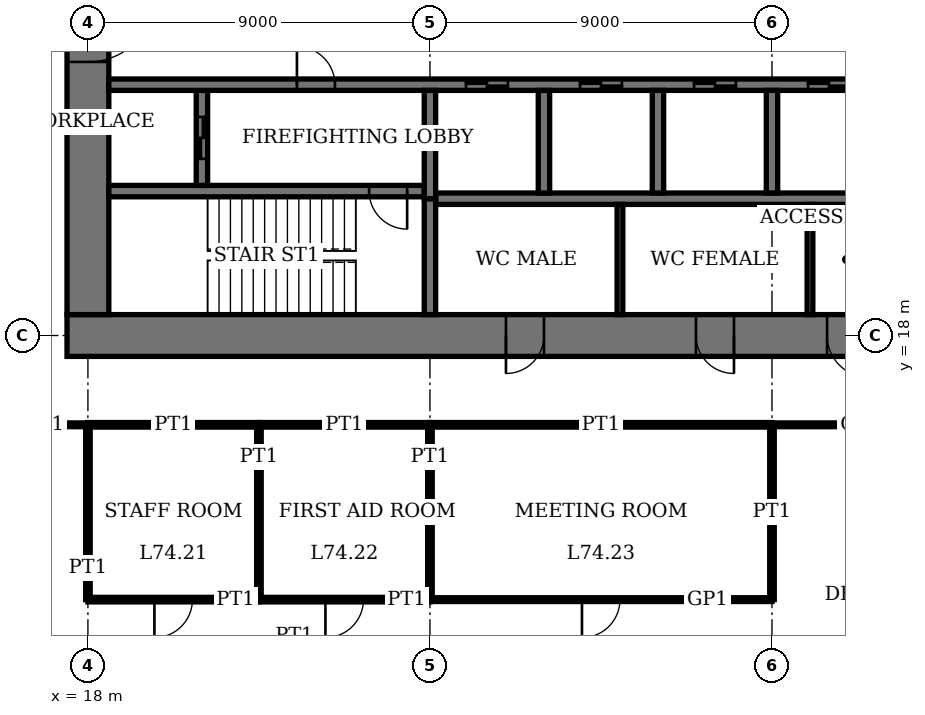
"""IFC4 building model, lengths in metres.
Left out: names, types, materials, properties, quantities, classifications, styles, units other than length and angle.
Written with IfcOpenShell. Run it as: python <this file> out.ifc"""

import sys

from ifc_helpers import new_model, si_unit, direction, frame, frame_2d, origin, place, context, subcontext, project, spatial, rectangle, extrude, element, fill, save


model = new_model("IFC4")
c1 = context("Model", 3, precision=1e-05, world=origin(), true_north=direction((0.0, 1.0)))
c2 = subcontext(c1, "Body", "Model", "MODEL_VIEW")
j1 = project(units=[si_unit("LENGTHUNIT", "METRE"), si_unit("PLANEANGLEUNIT", "RADIAN")], contexts=[c1])
p1 = place(None, origin())
s1 = spatial("IfcSite", under=j1, at=p1, CompositionType="ELEMENT")
p2 = place(p1, origin())
s2 = spatial("IfcBuilding", under=s1, at=p2, CompositionType="ELEMENT")
p3 = place(p2, frame((0.0, 0.0, 303.4)))
s3 = spatial("IfcBuildingStorey", under=s2, at=p3, CompositionType="ELEMENT", Elevation=303.4)
p4 = place(p3, frame((17.45, 18.0, 0.0), z_axis=(0.0, 0.0, 1.0), x_axis=(1.0, 0.0, 0.0)))
e1 = element("IfcWall", 1, at=p4, inside=s3, PredefinedType="SHEAR", context=c2, shape_type="SweptSolid", body=[
    extrude(rectangle(XDim=28.1, YDim=1.1, at=frame_2d((14.05, 0.0))), origin(), (0.0, 0.0, 1.0), 4.0),
])
p5 = place(p4, frame((11.55, 0.0, 0.0)))
e2 = element("IfcOpeningElement", 2, at=p5, cuts=e1, PredefinedType="OPENING", context=c2, shape_type="SweptSolid", body=[
    extrude(rectangle(XDim=1.0, YDim=2.4, at=frame_2d((0.5, 1.2))), frame((0.0, 0.56, 0.0), z_axis=(0.0, -1.0, 0.0), x_axis=(1.0, 0.0, 0.0)), (0.0, 0.0, 1.0), 1.12),
])
p6 = place(p4, frame((16.55, 0.0, 0.0)))
e3 = element("IfcOpeningElement", 3, at=p6, cuts=e1, PredefinedType="OPENING", context=c2, shape_type="SweptSolid", body=[
    extrude(rectangle(XDim=1.0, YDim=2.4, at=frame_2d((0.5, 1.2))), frame((0.0, 0.56, 0.0), z_axis=(0.0, -1.0, 0.0), x_axis=(1.0, 0.0, 0.0)), (0.0, 0.0, 1.0), 1.12),
])
p7 = place(p4, frame((20.0, 0.0, 0.0)))
e4 = element("IfcOpeningElement", 4, at=p7, cuts=e1, PredefinedType="OPENING", context=c2, shape_type="SweptSolid", body=[
    extrude(rectangle(XDim=1.1, YDim=2.4, at=frame_2d((0.55, 1.2))), frame((0.0, 0.56, 0.0), z_axis=(0.0, -1.0, 0.0), x_axis=(1.0, 0.0, 0.0)), (0.0, 0.0, 1.0), 1.12),
])
p8 = place(p4, frame((24.05, 0.0, 0.0)))
e5 = element("IfcOpeningElement", 5, at=p8, cuts=e1, PredefinedType="OPENING", context=c2, shape_type="SweptSolid", body=[
    extrude(rectangle(XDim=1.0, YDim=2.4, at=frame_2d((0.5, 1.2))), frame((0.0, 0.56, 0.0), z_axis=(0.0, -1.0, 0.0), x_axis=(1.0, 0.0, 0.0)), (0.0, 0.0, 1.0), 1.12),
])
p9 = place(p3, frame((18.0, 35.45, 0.0), z_axis=(0.0, 0.0, 1.0), x_axis=(0.0, -1.0, 0.0)))
e6 = element("IfcWall", 6, at=p9, inside=s3, PredefinedType="SHEAR", context=c2, shape_type="SweptSolid", body=[
    extrude(rectangle(XDim=16.9, YDim=1.1, at=frame_2d((8.45, 0.0))), origin(), (0.0, 0.0, 1.0), 4.0),
])
p10 = place(p9, frame((8.45, 0.0, 0.0)))
e7 = element("IfcOpeningElement", 7, at=p10, cuts=e6, PredefinedType="OPENING", context=c2, shape_type="SweptSolid", body=[
    extrude(rectangle(XDim=1.8, YDim=2.4, at=frame_2d((0.9, 1.2))), frame((0.0, 0.56, 0.0), z_axis=(0.0, -1.0, 0.0), x_axis=(1.0, 0.0, 0.0)), (0.0, 0.0, 1.0), 1.12),
])
p11 = place(p3, frame((18.55, 21.8, 0.0), z_axis=(0.0, 0.0, 1.0), x_axis=(1.0, 0.0, 0.0)))
e8 = element("IfcWall", 8, at=p11, inside=s3, PredefinedType="SHEAR", context=c2, shape_type="SweptSolid", body=[
    extrude(rectangle(XDim=8.3, YDim=0.3, at=frame_2d((4.15, 0.0))), origin(), (0.0, 0.0, 1.0), 4.0),
])
p12 = place(p11, frame((6.85, 0.0, 0.0)))
e9 = element("IfcOpeningElement", 9, at=p12, cuts=e8, PredefinedType="OPENING", context=c2, shape_type="SweptSolid", body=[
    extrude(rectangle(XDim=1.0, YDim=2.4, at=frame_2d((0.5, 1.2))), frame((0.0, 0.16, 0.0), z_axis=(0.0, -1.0, 0.0), x_axis=(1.0, 0.0, 0.0)), (0.0, 0.0, 1.0), 0.32),
])
p13 = place(p3, frame((27.0, 18.55, 0.0), z_axis=(0.0, 0.0, 1.0), x_axis=(0.0, 1.0, 0.0)))
e10 = element("IfcWall", 10, at=p13, inside=s3, PredefinedType="SHEAR", context=c2, shape_type="SweptSolid", body=[
    extrude(rectangle(XDim=3.05, YDim=0.3, at=frame_2d((1.525, 0.0))), origin(), (0.0, 0.0, 1.0), 4.0),
])
p14 = place(p3, frame((21.0, 21.95, 0.0), z_axis=(0.0, 0.0, 1.0), x_axis=(0.0, 1.0, 0.0)))
e11 = element("IfcWall", 11, at=p14, inside=s3, PredefinedType="SHEAR", context=c2, shape_type="SweptSolid", body=[
    extrude(rectangle(XDim=2.5, YDim=0.3, at=frame_2d((1.25, 0.0))), origin(), (0.0, 0.0, 1.0), 4.0),
])
p15 = place(p14, frame((0.7, 0.0, 0.0)))
e12 = element("IfcOpeningElement", 12, at=p15, cuts=e11, PredefinedType="OPENING", context=c2, shape_type="SweptSolid", body=[
    extrude(rectangle(XDim=1.1, YDim=2.4, at=frame_2d((0.55, 1.2))), frame((0.0, 0.16, 0.0), z_axis=(0.0, -1.0, 0.0), x_axis=(1.0, 0.0, 0.0)), (0.0, 0.0, 1.0), 0.32),
])
p16 = place(p3, frame((18.55, 24.6, 0.0), z_axis=(0.0, 0.0, 1.0), x_axis=(1.0, 0.0, 0.0)))
e13 = element("IfcWall", 13, at=p16, inside=s3, PredefinedType="SHEAR", context=c2, shape_type="SweptSolid", body=[
    extrude(rectangle(XDim=25.9, YDim=0.3, at=frame_2d((12.95, 0.0))), origin(), (0.0, 0.0, 1.0), 4.0),
])
p17 = place(p16, frame((4.95, 0.0, 0.0)))
e14 = element("IfcOpeningElement", 14, at=p17, cuts=e13, PredefinedType="OPENING", context=c2, shape_type="SweptSolid", body=[
    extrude(rectangle(XDim=1.0, YDim=2.4, at=frame_2d((0.5, 1.2))), frame((0.0, 0.16, 0.0), z_axis=(0.0, -1.0, 0.0), x_axis=(1.0, 0.0, 0.0)), (0.0, 0.0, 1.0), 0.32),
])
p18 = place(p16, frame((24.5, 0.0, 0.0)))
e15 = element("IfcOpeningElement", 15, at=p18, cuts=e13, PredefinedType="OPENING", context=c2, shape_type="SweptSolid", body=[
    extrude(rectangle(XDim=0.9, YDim=2.1, at=frame_2d((0.45, 1.05))), frame((0.0, 0.16, 0.0), z_axis=(0.0, -1.0, 0.0), x_axis=(1.0, 0.0, 0.0)), (0.0, 0.0, 1.0), 0.32),
])
p19 = place(p16, frame((9.4, 0.0, 0.0)))
e16 = element("IfcOpeningElement", 16, at=p19, cuts=e13, PredefinedType="OPENING", context=c2, shape_type="SweptSolid", body=[
    extrude(rectangle(XDim=1.1, YDim=2.4, at=frame_2d((0.55, 1.2))), frame((0.0, 0.16, 0.0), z_axis=(0.0, -1.0, 0.0), x_axis=(1.0, 0.0, 0.0)), (0.0, 0.0, 1.0), 0.32),
])
p20 = place(p16, frame((12.4, 0.0, 0.0)))
e17 = element("IfcOpeningElement", 17, at=p20, cuts=e13, PredefinedType="OPENING", context=c2, shape_type="SweptSolid", body=[
    extrude(rectangle(XDim=1.1, YDim=2.4, at=frame_2d((0.55, 1.2))), frame((0.0, 0.16, 0.0), z_axis=(0.0, -1.0, 0.0), x_axis=(1.0, 0.0, 0.0)), (0.0, 0.0, 1.0), 0.32),
])
p21 = place(p16, frame((15.4, 0.0, 0.0)))
e18 = element("IfcOpeningElement", 18, at=p21, cuts=e13, PredefinedType="OPENING", context=c2, shape_type="SweptSolid", body=[
    extrude(rectangle(XDim=1.1, YDim=2.4, at=frame_2d((0.55, 1.2))), frame((0.0, 0.16, 0.0), z_axis=(0.0, -1.0, 0.0), x_axis=(1.0, 0.0, 0.0)), (0.0, 0.0, 1.0), 0.32),
])
p22 = place(p16, frame((18.4, 0.0, 0.0)))
e19 = element("IfcOpeningElement", 19, at=p22, cuts=e13, PredefinedType="OPENING", context=c2, shape_type="SweptSolid", body=[
    extrude(rectangle(XDim=1.1, YDim=2.4, at=frame_2d((0.55, 1.2))), frame((0.0, 0.16, 0.0), z_axis=(0.0, -1.0, 0.0), x_axis=(1.0, 0.0, 0.0)), (0.0, 0.0, 1.0), 0.32),
])
p23 = place(p16, frame((21.3, 0.0, 0.0)))
e20 = element("IfcOpeningElement", 20, at=p23, cuts=e13, PredefinedType="OPENING", context=c2, shape_type="SweptSolid", body=[
    extrude(rectangle(XDim=1.3, YDim=2.4, at=frame_2d((0.65, 1.2))), frame((0.0, 0.16, 0.0), z_axis=(0.0, -1.0, 0.0), x_axis=(1.0, 0.0, 0.0)), (0.0, 0.0, 1.0), 0.32),
])
p24 = place(p3, frame((27.15, 21.6, 0.0), z_axis=(0.0, 0.0, 1.0), x_axis=(1.0, 0.0, 0.0)))
e21 = element("IfcWall", 21, at=p24, inside=s3, PredefinedType="SHEAR", context=c2, shape_type="SweptSolid", body=[
    extrude(rectangle(XDim=17.3, YDim=0.3, at=frame_2d((8.65, 0.0))), origin(), (0.0, 0.0, 1.0), 4.0),
])
for number, where, z_axis, x_axis in (
    (22, (30.0, 21.75, 0.0), (0.0, 0.0, 1.0), (0.0, 1.0, 0.0)),
    (23, (33.0, 21.75, 0.0), (0.0, 0.0, 1.0), (0.0, 1.0, 0.0)),
    (24, (36.0, 21.75, 0.0), (0.0, 0.0, 1.0), (0.0, 1.0, 0.0)),
):
    element("IfcWall", number, at=place(p3, frame(where, z_axis=z_axis, x_axis=x_axis)), inside=s3, PredefinedType="SHEAR", context=c2, shape_type="SweptSolid", body=[
        extrude(rectangle(XDim=2.7, YDim=0.3, at=frame_2d((1.35, 0.0))), origin(), (0.0, 0.0, 1.0), 4.0),
    ])
p25 = place(p3, frame((27.0, 21.6, 0.0), z_axis=(0.0, 0.0, 1.0), x_axis=(0.0, 1.0, 0.0)))
e25 = element("IfcWall", 25, at=p25, inside=s3, PredefinedType="SHEAR", context=c2, shape_type="SweptSolid", body=[
    extrude(rectangle(XDim=2.85, YDim=0.3, at=frame_2d((1.425, 0.0))), origin(), (0.0, 0.0, 1.0), 4.0),
])
p26 = place(p3, frame((18.0, 11.05, 0.0), z_axis=(0.0, 0.0, 1.0), x_axis=(1.0, 0.0, 0.0)))
e26 = element("IfcWall", 26, at=p26, inside=s3, PredefinedType="PARTITIONING", context=c2, shape_type="SweptSolid", body=[
    extrude(rectangle(XDim=4.5, YDim=0.12, at=frame_2d((2.25, 0.0))), origin(), (0.0, 0.0, 1.0), 3.75),
])
p27 = place(p26, frame((1.75, 0.0, 0.0)))
e27 = element("IfcOpeningElement", 27, at=p27, cuts=e26, PredefinedType="OPENING", context=c2, shape_type="SweptSolid", body=[
    extrude(rectangle(XDim=1.0, YDim=2.4, at=frame_2d((0.5, 1.2))), frame((0.0, 0.07, 0.0), z_axis=(0.0, -1.0, 0.0), x_axis=(1.0, 0.0, 0.0)), (0.0, 0.0, 1.0), 0.14),
])
p28 = place(p3, frame((22.5, 11.05, 0.0), z_axis=(0.0, 0.0, 1.0), x_axis=(1.0, 0.0, 0.0)))
e28 = element("IfcWall", 28, at=p28, inside=s3, PredefinedType="PARTITIONING", context=c2, shape_type="SweptSolid", body=[
    extrude(rectangle(XDim=4.5, YDim=0.12, at=frame_2d((2.25, 0.0))), origin(), (0.0, 0.0, 1.0), 3.75),
])
p29 = place(p28, frame((1.75, 0.0, 0.0)))
e29 = element("IfcOpeningElement", 29, at=p29, cuts=e28, PredefinedType="OPENING", context=c2, shape_type="SweptSolid", body=[
    extrude(rectangle(XDim=1.0, YDim=2.4, at=frame_2d((0.5, 1.2))), frame((0.0, 0.07, 0.0), z_axis=(0.0, -1.0, 0.0), x_axis=(1.0, 0.0, 0.0)), (0.0, 0.0, 1.0), 0.14),
])
p30 = place(p3, frame((27.0, 11.05, 0.0), z_axis=(0.0, 0.0, 1.0), x_axis=(1.0, 0.0, 0.0)))
e30 = element("IfcWall", 30, at=p30, inside=s3, PredefinedType="PARTITIONING", context=c2, shape_type="SweptSolid", body=[
    extrude(rectangle(XDim=9.0, YDim=0.1, at=frame_2d((4.5, 0.0))), origin(), (0.0, 0.0, 1.0), 3.75),
])
p31 = place(p30, frame((4.0, 0.0, 0.0)))
e31 = element("IfcOpeningElement", 31, at=p31, cuts=e30, PredefinedType="OPENING", context=c2, shape_type="SweptSolid", body=[
    extrude(rectangle(XDim=1.0, YDim=2.4, at=frame_2d((0.5, 1.2))), frame((0.0, 0.06, 0.0), z_axis=(0.0, -1.0, 0.0), x_axis=(1.0, 0.0, 0.0)), (0.0, 0.0, 1.0), 0.12),
])
p32 = place(p3, frame((27.0, 15.65, 0.0), z_axis=(0.0, 0.0, 1.0), x_axis=(1.0, 0.0, 0.0)))
e32 = element("IfcWall", 32, at=p32, inside=s3, PredefinedType="PARTITIONING", context=c2, shape_type="SweptSolid", body=[
    extrude(rectangle(XDim=9.0, YDim=0.12, at=frame_2d((4.5, 0.0))), origin(), (0.0, 0.0, 1.0), 3.75),
])
for number, where, z_axis, x_axis in (
    (33, (18.0, 15.65, 0.0), (0.0, 0.0, 1.0), (1.0, 0.0, 0.0)),
    (34, (22.5, 15.65, 0.0), (0.0, 0.0, 1.0), (1.0, 0.0, 0.0)),
):
    element("IfcWall", number, at=place(p3, frame(where, z_axis=z_axis, x_axis=x_axis)), inside=s3, PredefinedType="PARTITIONING", context=c2, shape_type="SweptSolid", body=[
        extrude(rectangle(XDim=4.5, YDim=0.12, at=frame_2d((2.25, 0.0))), origin(), (0.0, 0.0, 1.0), 3.75),
    ])
p33 = place(p3, frame((36.01, 15.65, 0.0), z_axis=(0.0, 0.0, 1.0), x_axis=(1.0, 0.0, 0.0)))
e35 = element("IfcWall", 35, at=p33, inside=s3, PredefinedType="PARTITIONING", context=c2, shape_type="SweptSolid", body=[
    extrude(rectangle(XDim=11.33, YDim=0.1, at=frame_2d((5.665, 0.0))), origin(), (0.0, 0.0, 1.0), 3.75),
])
p34 = place(p33, frame((5.165, 0.0, 0.0)))
e36 = element("IfcOpeningElement", 36, at=p34, cuts=e35, PredefinedType="OPENING", context=c2, shape_type="SweptSolid", body=[
    extrude(rectangle(XDim=1.0, YDim=2.4, at=frame_2d((0.5, 1.2))), frame((0.0, 0.06, 0.0), z_axis=(0.0, -1.0, 0.0), x_axis=(1.0, 0.0, 0.0)), (0.0, 0.0, 1.0), 0.12),
])
p35 = place(p3, frame((15.66, 15.65, 0.0), z_axis=(0.0, 0.0, 1.0), x_axis=(1.0, 0.0, 0.0)))
e37 = element("IfcWall", 37, at=p35, inside=s3, PredefinedType="PARTITIONING", context=c2, shape_type="SweptSolid", body=[
    extrude(rectangle(XDim=2.33, YDim=0.1, at=frame_2d((1.165, 0.0))), origin(), (0.0, 0.0, 1.0), 3.75),
])
p36 = place(p3, frame((18.0, 11.05, 0.0), z_axis=(0.0, 0.0, 1.0), x_axis=(0.0, 1.0, 0.0)))
e38 = element("IfcWall", 38, at=p36, inside=s3, PredefinedType="PARTITIONING", context=c2, shape_type="SweptSolid", body=[
    extrude(rectangle(XDim=4.6, YDim=0.12, at=frame_2d((2.3, 0.0))), origin(), (0.0, 0.0, 1.0), 3.05),
])
p37 = place(p3, frame((22.5, 11.05, 0.0), z_axis=(0.0, 0.0, 1.0), x_axis=(0.0, 1.0, 0.0)))
e39 = element("IfcWall", 39, at=p37, inside=s3, PredefinedType="PARTITIONING", context=c2, shape_type="SweptSolid", body=[
    extrude(rectangle(XDim=4.6, YDim=0.12, at=frame_2d((2.3, 0.0))), origin(), (0.0, 0.0, 1.0), 3.75),
])
for number, where, z_axis, x_axis in (
    (40, (27.0, 11.05, 0.0), (0.0, 0.0, 1.0), (0.0, 1.0, 0.0)),
    (41, (36.0, 11.05, 0.0), (0.0, 0.0, 1.0), (0.0, 1.0, 0.0)),
):
    element("IfcWall", number, at=place(p3, frame(where, z_axis=z_axis, x_axis=x_axis)), inside=s3, PredefinedType="PARTITIONING", context=c2, shape_type="SweptSolid", body=[
        extrude(rectangle(XDim=4.6, YDim=0.12, at=frame_2d((2.3, 0.0))), origin(), (0.0, 0.0, 1.0), 3.05),
    ])
for number, where, z_axis, x_axis in (
    (42, (32.0, 18.55, 0.0), (0.0, 0.0, 1.0), (0.0, 1.0, 0.0)),
    (43, (37.0, 18.55, 0.0), (0.0, 0.0, 1.0), (0.0, 1.0, 0.0)),
):
    element("IfcWall", number, at=place(p3, frame(where, z_axis=z_axis, x_axis=x_axis)), inside=s3, PredefinedType="PARTITIONING", context=c2, shape_type="SweptSolid", body=[
        extrude(rectangle(XDim=2.9, YDim=0.15, at=frame_2d((1.45, 0.0))), origin(), (0.0, 0.0, 1.0), 3.75),
    ])
p38 = place(p10, origin())
e44 = element("IfcDoor", 44, at=p38, inside=s3, OperationType="DOUBLE_DOOR_DOUBLE_SWING", PredefinedType="DOOR", context=c2, shape_type="SweptSolid", body=[
    extrude(rectangle(XDim=1.8, YDim=2.4, at=frame_2d((0.9, 1.2))), frame((0.0, 0.03, 0.0), z_axis=(0.0, -1.0, 0.0), x_axis=(1.0, 0.0, 0.0)), (0.0, 0.0, 1.0), 0.06),
    extrude(rectangle(XDim=0.04, YDim=2.4, at=frame_2d((0.02, 1.2))), frame((0.0, 0.55, 0.0), z_axis=(0.0, -1.0, 0.0), x_axis=(1.0, 0.0, 0.0)), (0.0, 0.0, 1.0), 1.1),
    extrude(rectangle(XDim=0.04, YDim=2.4, at=frame_2d((1.78, 1.2))), frame((0.0, 0.55, 0.0), z_axis=(0.0, -1.0, 0.0), x_axis=(1.0, 0.0, 0.0)), (0.0, 0.0, 1.0), 1.1),
    extrude(rectangle(XDim=1.8, YDim=0.04, at=frame_2d((0.9, 2.38))), frame((0.0, 0.55, 0.0), z_axis=(0.0, -1.0, 0.0), x_axis=(1.0, 0.0, 0.0)), (0.0, 0.0, 1.0), 1.1),
])
fill(e7, e44)
p39 = place(p5, origin())
e45 = element("IfcDoor", 45, at=p39, inside=s3, OperationType="SINGLE_SWING_LEFT", PredefinedType="DOOR", context=c2, shape_type="SweptSolid", body=[
    extrude(rectangle(XDim=1.0, YDim=2.4, at=frame_2d((0.5, 1.2))), frame((0.0, 0.025, 0.0), z_axis=(0.0, -1.0, 0.0), x_axis=(1.0, 0.0, 0.0)), (0.0, 0.0, 1.0), 0.05),
    extrude(rectangle(XDim=0.04, YDim=2.4, at=frame_2d((0.02, 1.2))), frame((0.0, 0.4, 0.0), z_axis=(0.0, -1.0, 0.0), x_axis=(1.0, 0.0, 0.0)), (0.0, 0.0, 1.0), 0.8),
    extrude(rectangle(XDim=0.04, YDim=2.4, at=frame_2d((0.98, 1.2))), frame((0.0, 0.4, 0.0), z_axis=(0.0, -1.0, 0.0), x_axis=(1.0, 0.0, 0.0)), (0.0, 0.0, 1.0), 0.8),
    extrude(rectangle(XDim=1.0, YDim=0.04, at=frame_2d((0.5, 2.38))), frame((0.0, 0.4, 0.0), z_axis=(0.0, -1.0, 0.0), x_axis=(1.0, 0.0, 0.0)), (0.0, 0.0, 1.0), 0.8),
])
fill(e2, e45)
p40 = place(p6, origin())
e46 = element("IfcDoor", 46, at=p40, inside=s3, OperationType="SINGLE_SWING_RIGHT", PredefinedType="DOOR", context=c2, shape_type="SweptSolid", body=[
    extrude(rectangle(XDim=1.0, YDim=2.4, at=frame_2d((0.5, 1.2))), frame((0.0, 0.025, 0.0), z_axis=(0.0, -1.0, 0.0), x_axis=(1.0, 0.0, 0.0)), (0.0, 0.0, 1.0), 0.05),
    extrude(rectangle(XDim=0.04, YDim=2.4, at=frame_2d((0.02, 1.2))), frame((0.0, 0.4, 0.0), z_axis=(0.0, -1.0, 0.0), x_axis=(1.0, 0.0, 0.0)), (0.0, 0.0, 1.0), 0.8),
    extrude(rectangle(XDim=0.04, YDim=2.4, at=frame_2d((0.98, 1.2))), frame((0.0, 0.4, 0.0), z_axis=(0.0, -1.0, 0.0), x_axis=(1.0, 0.0, 0.0)), (0.0, 0.0, 1.0), 0.8),
    extrude(rectangle(XDim=1.0, YDim=0.04, at=frame_2d((0.5, 2.38))), frame((0.0, 0.4, 0.0), z_axis=(0.0, -1.0, 0.0), x_axis=(1.0, 0.0, 0.0)), (0.0, 0.0, 1.0), 0.8),
])
fill(e3, e46)
p41 = place(p7, origin())
e47 = element("IfcDoor", 47, at=p41, inside=s3, OperationType="SINGLE_SWING_RIGHT", PredefinedType="DOOR", context=c2, shape_type="SweptSolid", body=[
    extrude(rectangle(XDim=1.1, YDim=2.4, at=frame_2d((0.55, 1.2))), frame((0.0, 0.025, 0.0), z_axis=(0.0, -1.0, 0.0), x_axis=(1.0, 0.0, 0.0)), (0.0, 0.0, 1.0), 0.05),
    extrude(rectangle(XDim=0.04, YDim=2.4, at=frame_2d((0.02, 1.2))), frame((0.0, 0.44, 0.0), z_axis=(0.0, -1.0, 0.0), x_axis=(1.0, 0.0, 0.0)), (0.0, 0.0, 1.0), 0.88),
    extrude(rectangle(XDim=0.04, YDim=2.4, at=frame_2d((1.08, 1.2))), frame((0.0, 0.44, 0.0), z_axis=(0.0, -1.0, 0.0), x_axis=(1.0, 0.0, 0.0)), (0.0, 0.0, 1.0), 0.88),
    extrude(rectangle(XDim=1.1, YDim=0.04, at=frame_2d((0.55, 2.38))), frame((0.0, 0.44, 0.0), z_axis=(0.0, -1.0, 0.0), x_axis=(1.0, 0.0, 0.0)), (0.0, 0.0, 1.0), 0.88),
])
fill(e4, e47)
p42 = place(p12, origin())
e48 = element("IfcDoor", 48, at=p42, inside=s3, OperationType="SINGLE_SWING_RIGHT", PredefinedType="DOOR", context=c2, shape_type="SweptSolid", body=[
    extrude(rectangle(XDim=1.0, YDim=2.4, at=frame_2d((0.5, 1.2))), frame((0.0, 0.03, 0.0), z_axis=(0.0, -1.0, 0.0), x_axis=(1.0, 0.0, 0.0)), (0.0, 0.0, 1.0), 0.06),
])
fill(e9, e48)
p43 = place(p17, origin())
e49 = element("IfcDoor", 49, at=p43, inside=s3, OperationType="SINGLE_SWING_RIGHT", PredefinedType="DOOR", context=c2, shape_type="SweptSolid", body=[
    extrude(rectangle(XDim=1.0, YDim=2.4, at=frame_2d((0.5, 1.2))), frame((0.0, 0.03, 0.0), z_axis=(0.0, -1.0, 0.0), x_axis=(1.0, 0.0, 0.0)), (0.0, 0.0, 1.0), 0.06),
])
fill(e14, e49)
p44 = place(p27, origin())
e50 = element("IfcDoor", 50, at=p44, inside=s3, OperationType="SINGLE_SWING_LEFT", PredefinedType="DOOR", context=c2, shape_type="SweptSolid", body=[
    extrude(rectangle(XDim=1.0, YDim=2.4, at=frame_2d((0.5, 1.2))), frame((0.0, 0.025, 0.0), z_axis=(0.0, -1.0, 0.0), x_axis=(1.0, 0.0, 0.0)), (0.0, 0.0, 1.0), 0.05),
])
fill(e27, e50)
p45 = place(p29, origin())
e51 = element("IfcDoor", 51, at=p45, inside=s3, OperationType="SINGLE_SWING_LEFT", PredefinedType="DOOR", context=c2, shape_type="SweptSolid", body=[
    extrude(rectangle(XDim=1.0, YDim=2.4, at=frame_2d((0.5, 1.2))), frame((0.0, 0.025, 0.0), z_axis=(0.0, -1.0, 0.0), x_axis=(1.0, 0.0, 0.0)), (0.0, 0.0, 1.0), 0.05),
])
fill(e29, e51)
p46 = place(p31, origin())
e52 = element("IfcDoor", 52, at=p46, inside=s3, OperationType="SINGLE_SWING_LEFT", PredefinedType="DOOR", context=c2, shape_type="SweptSolid", body=[
    extrude(rectangle(XDim=1.0, YDim=2.4, at=frame_2d((0.5, 1.2))), frame((0.0, 0.02, 0.0), z_axis=(0.0, -1.0, 0.0), x_axis=(1.0, 0.0, 0.0)), (0.0, 0.0, 1.0), 0.04),
])
fill(e31, e52)
p47 = place(p19, origin())
e53 = element("IfcDoor", 53, at=p47, inside=s3, OperationType="DOUBLE_DOOR_SLIDING", PredefinedType="DOOR", context=c2, shape_type="SweptSolid", body=[
    extrude(rectangle(XDim=1.1, YDim=2.4, at=frame_2d((0.55, 1.2))), frame((0.0, 0.02, 0.0), z_axis=(0.0, -1.0, 0.0), x_axis=(1.0, 0.0, 0.0)), (0.0, 0.0, 1.0), 0.04),
])
fill(e16, e53)
p48 = place(p20, origin())
e54 = element("IfcDoor", 54, at=p48, inside=s3, OperationType="DOUBLE_DOOR_SLIDING", PredefinedType="DOOR", context=c2, shape_type="SweptSolid", body=[
    extrude(rectangle(XDim=1.1, YDim=2.4, at=frame_2d((0.55, 1.2))), frame((0.0, 0.02, 0.0), z_axis=(0.0, -1.0, 0.0), x_axis=(1.0, 0.0, 0.0)), (0.0, 0.0, 1.0), 0.04),
])
fill(e17, e54)
p49 = place(p21, origin())
e55 = element("IfcDoor", 55, at=p49, inside=s3, OperationType="DOUBLE_DOOR_SLIDING", PredefinedType="DOOR", context=c2, shape_type="SweptSolid", body=[
    extrude(rectangle(XDim=1.1, YDim=2.4, at=frame_2d((0.55, 1.2))), frame((0.0, 0.02, 0.0), z_axis=(0.0, -1.0, 0.0), x_axis=(1.0, 0.0, 0.0)), (0.0, 0.0, 1.0), 0.04),
])
fill(e18, e55)
p50 = place(p22, origin())
e56 = element("IfcDoor", 56, at=p50, inside=s3, OperationType="DOUBLE_DOOR_SLIDING", PredefinedType="DOOR", context=c2, shape_type="SweptSolid", body=[
    extrude(rectangle(XDim=1.1, YDim=2.4, at=frame_2d((0.55, 1.2))), frame((0.0, 0.02, 0.0), z_axis=(0.0, -1.0, 0.0), x_axis=(1.0, 0.0, 0.0)), (0.0, 0.0, 1.0), 0.04),
])
fill(e19, e56)
p51 = place(p15, origin())
e57 = element("IfcDoor", 57, at=p51, inside=s3, OperationType="DOUBLE_DOOR_SLIDING", PredefinedType="DOOR", context=c2, shape_type="SweptSolid", body=[
    extrude(rectangle(XDim=1.1, YDim=2.4, at=frame_2d((0.55, 1.2))), frame((0.0, 0.03, 0.0), z_axis=(0.0, -1.0, 0.0), x_axis=(1.0, 0.0, 0.0)), (0.0, 0.0, 1.0), 0.06),
])
fill(e12, e57)
save(model, sys.argv[1])
